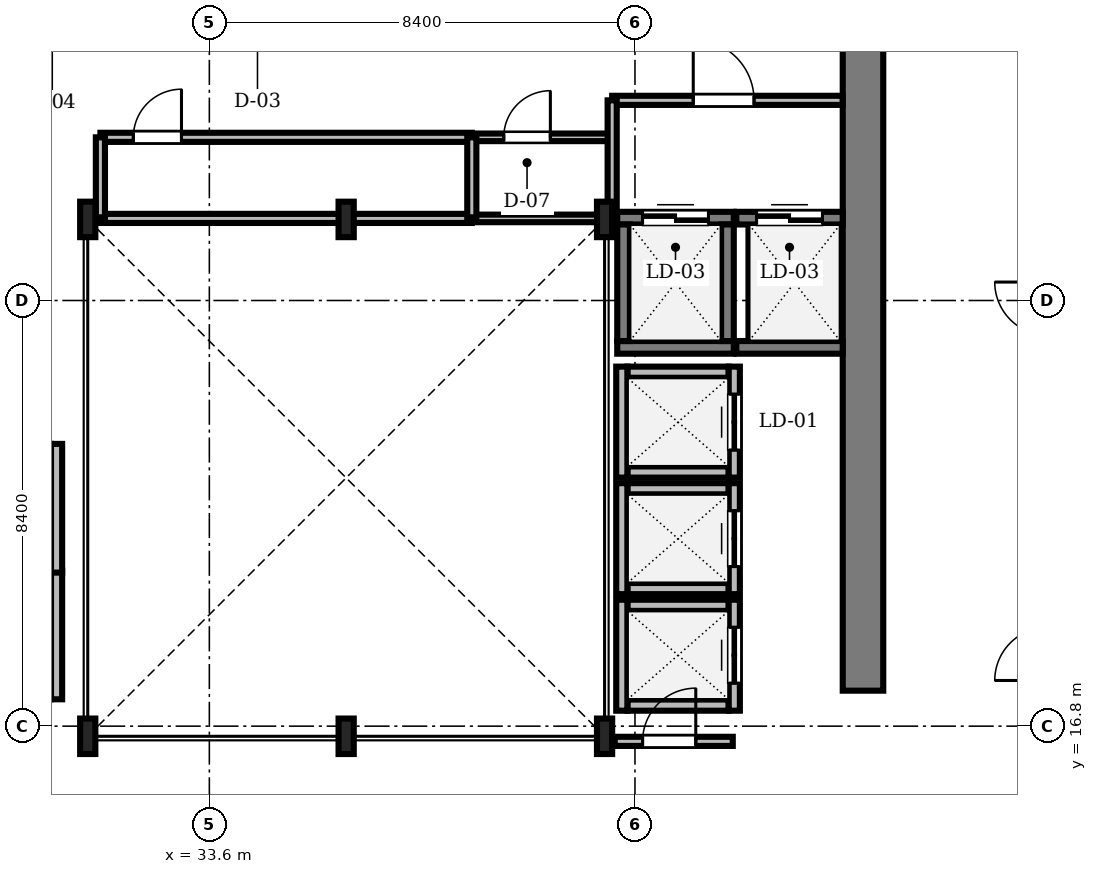
"""IFC4 building model, lengths in metres.
Left out: names, types, materials, properties, quantities, classifications, styles, units other than length and angle.
Written with IfcOpenShell. Run it as: python <this file> out.ifc"""

import sys

from ifc_helpers import new_model, si_unit, direction, frame, frame_2d, origin, origin_2d, place, context, subcontext, project, spatial, rectangle, i_section, extrude, source, transform, mapped, element, fill, save


model = new_model("IFC4")
c1 = context("Model", 3, precision=1e-05, world=origin(), true_north=direction((0.0, 1.0)))
c2 = subcontext(c1, "Body", "Model", "MODEL_VIEW")
j1 = project(units=[si_unit("LENGTHUNIT", "METRE"), si_unit("PLANEANGLEUNIT", "RADIAN")], contexts=[c1])
p1 = place(None, origin())
s1 = spatial("IfcSite", under=j1, at=p1, CompositionType="ELEMENT")
p2 = place(p1, origin())
s2 = spatial("IfcBuilding", under=s1, at=p2, CompositionType="ELEMENT")
p3 = place(p2, frame((0.0, 0.0, 199.8)))
s3 = spatial("IfcBuildingStorey", under=s2, at=p3, CompositionType="ELEMENT", Elevation=199.8)
m1 = source(origin(), c2, "Body", "SweptSolid", [
    extrude(rectangle(XDim=13.15, YDim=0.8, at=frame_2d((6.575, 0.0))), origin(), (0.0, 0.0, 1.0), 3.53),
])
p4 = place(p3, frame((46.5, 17.5, 0.0), z_axis=(0.0, 0.0, 1.0), x_axis=(0.0, 1.0, 0.0)))
e1 = element("IfcWall", 1, at=p4, inside=s3, PredefinedType="SHEAR", context=c2, shape_type="MappedRepresentation", body=[
    mapped(m1, transform((0.0, 0.0, 0.0), scale=1.0)),
])
m2 = source(origin(), c2, "Body", "SweptSolid", [
    extrude(i_section(OverallWidth=0.3, OverallDepth=0.7, WebThickness=0.017, FlangeThickness=0.032, FilletRadius=0.027, at=origin_2d()), origin(), (0.0, 0.0, 1.0), 3.53),
])
for number, where, z_axis, x_axis in (
    (2, (31.2, 16.6, 0.0), (0.0, 0.0, 1.0), (1.0, 0.0, 0.0)),
    (3, (36.3, 16.6, 0.0), (0.0, 0.0, 1.0), (1.0, 0.0, 0.0)),
    (4, (41.4, 16.6, 0.0), (0.0, 0.0, 1.0), (1.0, 0.0, 0.0)),
    (5, (41.4, 26.8, 0.0), (0.0, 0.0, 1.0), (1.0, 0.0, 0.0)),
    (6, (36.3, 26.8, 0.0), (0.0, 0.0, 1.0), (1.0, 0.0, 0.0)),
    (7, (31.2, 26.8, 0.0), (0.0, 0.0, 1.0), (1.0, 0.0, 0.0)),
):
    element("IfcColumn", number, at=place(p3, frame(where, z_axis=z_axis, x_axis=x_axis)), inside=s3, PredefinedType="COLUMN", context=c2, shape_type="MappedRepresentation", body=[
        mapped(m2, transform((0.0, 0.0, 0.0), scale=1.0)),
    ])
m3 = source(origin(), c2, "Body", "SweptSolid", [
    extrude(rectangle(XDim=2.0, YDim=0.22, at=frame_2d((1.0, 0.0))), origin(), (0.0, 0.0, 1.0), 3.53),
])
for number, where, z_axis, x_axis in (
    (8, (41.85, 21.815, 0.0), (0.0, 0.0, 1.0), (1.0, 0.0, 0.0)),
    (9, (41.85, 23.785, 0.0), (0.0, 0.0, 1.0), (1.0, 0.0, 0.0)),
):
    element("IfcWall", number, at=place(p3, frame(where, z_axis=z_axis, x_axis=x_axis)), inside=s3, PredefinedType="SOLIDWALL", context=c2, shape_type="MappedRepresentation", body=[
        mapped(m3, transform((0.0, 0.0, 0.0), scale=1.0)),
    ])
m4 = source(origin(), c2, "Body", "SweptSolid", [
    extrude(rectangle(XDim=2.19, YDim=0.22, at=frame_2d((1.095, 0.0))), origin(), (0.0, 0.0, 1.0), 3.53),
])
p5 = place(p3, frame((41.74, 21.705, 0.0), z_axis=(0.0, 0.0, 1.0), x_axis=(0.0, 1.0, 0.0)))
e10 = element("IfcWall", 10, at=p5, inside=s3, PredefinedType="SOLIDWALL", context=c2, shape_type="MappedRepresentation", body=[
    mapped(m4, transform((0.0, 0.0, 0.0), scale=1.0)),
])
p6 = place(p3, frame((43.96, 21.705, 0.0), z_axis=(0.0, 0.0, 1.0), x_axis=(0.0, 1.0, 0.0)))
e11 = element("IfcWall", 11, at=p6, inside=s3, PredefinedType="SOLIDWALL", context=c2, shape_type="MappedRepresentation", body=[
    mapped(m4, transform((0.0, 0.0, 0.0), scale=1.0)),
])
m5 = source(origin(), c2, "Body", "SweptSolid", [
    extrude(rectangle(XDim=1.1, YDim=2.2, at=frame_2d((0.55, 1.1))), frame((0.0, 0.12, 0.0), z_axis=(0.0, -1.0, 0.0), x_axis=(1.0, 0.0, 0.0)), (0.0, 0.0, 1.0), 0.24),
])
p7 = place(p6, frame((0.545, 0.0, 0.0)))
e12 = element("IfcOpeningElement", 12, at=p7, cuts=e11, PredefinedType="OPENING", context=c2, shape_type="MappedRepresentation", body=[
    mapped(m5, transform((0.0, 0.0, 0.0), scale=1.0)),
])
for number, where, z_axis, x_axis in (
    (13, (41.85, 19.515, 0.0), (0.0, 0.0, 1.0), (1.0, 0.0, 0.0)),
    (14, (41.85, 21.485, 0.0), (0.0, 0.0, 1.0), (1.0, 0.0, 0.0)),
):
    element("IfcWall", number, at=place(p3, frame(where, z_axis=z_axis, x_axis=x_axis)), inside=s3, PredefinedType="SOLIDWALL", context=c2, shape_type="MappedRepresentation", body=[
        mapped(m3, transform((0.0, 0.0, 0.0), scale=1.0)),
    ])
p8 = place(p3, frame((41.74, 19.405, 0.0), z_axis=(0.0, 0.0, 1.0), x_axis=(0.0, 1.0, 0.0)))
e15 = element("IfcWall", 15, at=p8, inside=s3, PredefinedType="SOLIDWALL", context=c2, shape_type="MappedRepresentation", body=[
    mapped(m4, transform((0.0, 0.0, 0.0), scale=1.0)),
])
p9 = place(p3, frame((43.96, 19.405, 0.0), z_axis=(0.0, 0.0, 1.0), x_axis=(0.0, 1.0, 0.0)))
e16 = element("IfcWall", 16, at=p9, inside=s3, PredefinedType="SOLIDWALL", context=c2, shape_type="MappedRepresentation", body=[
    mapped(m4, transform((0.0, 0.0, 0.0), scale=1.0)),
])
p10 = place(p9, frame((0.545, 0.0, 0.0)))
e17 = element("IfcOpeningElement", 17, at=p10, cuts=e16, PredefinedType="OPENING", context=c2, shape_type="MappedRepresentation", body=[
    mapped(m5, transform((0.0, 0.0, 0.0), scale=1.0)),
])
for number, where, z_axis, x_axis in (
    (18, (41.85, 17.215, 0.0), (0.0, 0.0, 1.0), (1.0, 0.0, 0.0)),
    (19, (41.85, 19.185, 0.0), (0.0, 0.0, 1.0), (1.0, 0.0, 0.0)),
):
    element("IfcWall", number, at=place(p3, frame(where, z_axis=z_axis, x_axis=x_axis)), inside=s3, PredefinedType="SOLIDWALL", context=c2, shape_type="MappedRepresentation", body=[
        mapped(m3, transform((0.0, 0.0, 0.0), scale=1.0)),
    ])
p11 = place(p3, frame((41.74, 17.105, 0.0), z_axis=(0.0, 0.0, 1.0), x_axis=(0.0, 1.0, 0.0)))
e20 = element("IfcWall", 20, at=p11, inside=s3, PredefinedType="SOLIDWALL", context=c2, shape_type="MappedRepresentation", body=[
    mapped(m4, transform((0.0, 0.0, 0.0), scale=1.0)),
])
p12 = place(p3, frame((43.96, 17.105, 0.0), z_axis=(0.0, 0.0, 1.0), x_axis=(0.0, 1.0, 0.0)))
e21 = element("IfcWall", 21, at=p12, inside=s3, PredefinedType="SOLIDWALL", context=c2, shape_type="MappedRepresentation", body=[
    mapped(m4, transform((0.0, 0.0, 0.0), scale=1.0)),
])
p13 = place(p12, frame((0.545, 0.0, 0.0)))
e22 = element("IfcOpeningElement", 22, at=p13, cuts=e21, PredefinedType="OPENING", context=c2, shape_type="MappedRepresentation", body=[
    mapped(m5, transform((0.0, 0.0, 0.0), scale=1.0)),
])
m6 = source(origin(), c2, "Body", "SweptSolid", [
    extrude(rectangle(XDim=2.54, YDim=0.22, at=frame_2d((1.27, 0.0))), origin(), (0.0, 0.0, 1.0), 3.53),
])
for number, where, z_axis, x_axis in (
    (23, (30.585, 17.33, 0.0), (0.0, 0.0, 1.0), (0.0, 1.0, 0.0)),
    (24, (30.585, 19.83, 0.0), (0.0, 0.0, 1.0), (0.0, 1.0, 0.0)),
):
    element("IfcWall", number, at=place(p3, frame(where, z_axis=z_axis, x_axis=x_axis)), inside=s3, PredefinedType="SOLIDWALL", context=c2, shape_type="MappedRepresentation", body=[
        mapped(m6, transform((0.0, 0.0, 0.0), scale=1.0)),
    ])
m7 = source(origin(), c2, "Body", "SweptSolid", [
    extrude(rectangle(XDim=2.3, YDim=0.25, at=frame_2d((1.15, 0.0))), origin(), (0.0, 0.0, 1.0), 3.53),
])
p14 = place(p3, frame((41.65, 24.275, 0.0), z_axis=(0.0, 0.0, 1.0), x_axis=(1.0, 0.0, 0.0)))
e25 = element("IfcWall", 25, at=p14, inside=s3, PredefinedType="SOLIDWALL", context=c2, shape_type="MappedRepresentation", body=[
    mapped(m7, transform((0.0, 0.0, 0.0), scale=1.0)),
])
p15 = place(p3, frame((41.65, 26.825, 0.0), z_axis=(0.0, 0.0, 1.0), x_axis=(1.0, 0.0, 0.0)))
e26 = element("IfcWall", 26, at=p15, inside=s3, PredefinedType="SOLIDWALL", context=c2, shape_type="MappedRepresentation", body=[
    mapped(m7, transform((0.0, 0.0, 0.0), scale=1.0)),
])
m8 = source(origin(), c2, "Body", "SweptSolid", [
    extrude(rectangle(XDim=1.3, YDim=2.3, at=frame_2d((0.65, 1.15))), frame((0.0, 0.135, 0.0), z_axis=(0.0, -1.0, 0.0), x_axis=(1.0, 0.0, 0.0)), (0.0, 0.0, 1.0), 0.27),
])
p16 = place(p15, frame((0.5, 0.0, 0.0)))
e27 = element("IfcOpeningElement", 27, at=p16, cuts=e26, PredefinedType="OPENING", context=c2, shape_type="MappedRepresentation", body=[
    mapped(m8, transform((0.0, 0.0, 0.0), scale=1.0)),
])
for number, where, z_axis, x_axis in (
    (28, (41.775, 24.4, 0.0), (0.0, 0.0, 1.0), (0.0, 1.0, 0.0)),
    (29, (43.825, 24.4, 0.0), (0.0, 0.0, 1.0), (0.0, 1.0, 0.0)),
):
    element("IfcWall", number, at=place(p3, frame(where, z_axis=z_axis, x_axis=x_axis)), inside=s3, PredefinedType="SOLIDWALL", context=c2, shape_type="MappedRepresentation", body=[
        mapped(m7, transform((0.0, 0.0, 0.0), scale=1.0)),
    ])
m9 = source(origin(), c2, "Body", "SweptSolid", [
    extrude(rectangle(XDim=2.1, YDim=0.25, at=frame_2d((1.05, 0.0))), origin(), (0.0, 0.0, 1.0), 3.53),
])
p17 = place(p3, frame((44.0, 24.275, 0.0), z_axis=(0.0, 0.0, 1.0), x_axis=(1.0, 0.0, 0.0)))
e30 = element("IfcWall", 30, at=p17, inside=s3, PredefinedType="SOLIDWALL", context=c2, shape_type="MappedRepresentation", body=[
    mapped(m9, transform((0.0, 0.0, 0.0), scale=1.0)),
])
p18 = place(p3, frame((44.0, 26.825, 0.0), z_axis=(0.0, 0.0, 1.0), x_axis=(1.0, 0.0, 0.0)))
e31 = element("IfcWall", 31, at=p18, inside=s3, PredefinedType="SOLIDWALL", context=c2, shape_type="MappedRepresentation", body=[
    mapped(m9, transform((0.0, 0.0, 0.0), scale=1.0)),
])
p19 = place(p18, frame((0.4, 0.0, 0.0)))
e32 = element("IfcOpeningElement", 32, at=p19, cuts=e31, PredefinedType="OPENING", context=c2, shape_type="MappedRepresentation", body=[
    mapped(m8, transform((0.0, 0.0, 0.0), scale=1.0)),
])
m10 = source(origin(), c2, "Body", "SweptSolid", [
    extrude(rectangle(XDim=7.33, YDim=0.18, at=frame_2d((3.665, 0.0))), origin(), (0.0, 0.0, 1.0), 3.162),
])
p20 = place(p3, frame((31.45, 28.42, 0.0), z_axis=(0.0, 0.0, 1.0), x_axis=(1.0, 0.0, 0.0)))
e33 = element("IfcWall", 33, at=p20, inside=s3, PredefinedType="PARTITIONING", context=c2, shape_type="MappedRepresentation", body=[
    mapped(m10, transform((0.0, 0.0, 0.0), scale=1.0)),
])
m11 = source(origin(), c2, "Body", "SweptSolid", [
    extrude(rectangle(XDim=0.95, YDim=2.15, at=frame_2d((0.475, 1.075))), frame((0.0, 0.1, 0.0), z_axis=(0.0, -1.0, 0.0), x_axis=(1.0, 0.0, 0.0)), (0.0, 0.0, 1.0), 0.2),
])
p21 = place(p20, frame((0.65, 0.0, 0.0)))
e34 = element("IfcOpeningElement", 34, at=p21, cuts=e33, PredefinedType="OPENING", context=c2, shape_type="MappedRepresentation", body=[
    mapped(m11, transform((0.0, 0.0, 0.0), scale=1.0)),
])
m12 = source(origin(), c2, "Body", "SweptSolid", [
    extrude(rectangle(XDim=4.548, YDim=0.18, at=frame_2d((2.274, 0.0))), origin(), (0.0, 0.0, 1.0), 3.162),
])
p22 = place(p3, frame((41.55, 29.15, 0.0), z_axis=(0.0, 0.0, 1.0), x_axis=(1.0, 0.0, 0.0)))
e35 = element("IfcWall", 35, at=p22, inside=s3, PredefinedType="PARTITIONING", context=c2, shape_type="MappedRepresentation", body=[
    mapped(m12, transform((0.0, 0.0, 0.0), scale=1.0)),
])
m13 = source(origin(), c2, "Body", "SweptSolid", [
    extrude(rectangle(XDim=1.2, YDim=2.2, at=frame_2d((0.6, 1.1))), frame((0.0, 0.1, 0.0), z_axis=(0.0, -1.0, 0.0), x_axis=(1.0, 0.0, 0.0)), (0.0, 0.0, 1.0), 0.2),
])
p23 = place(p22, frame((1.6, 0.0, 0.0)))
e36 = element("IfcOpeningElement", 36, at=p23, cuts=e35, PredefinedType="OPENING", context=c2, shape_type="MappedRepresentation", body=[
    mapped(m13, transform((0.0, 0.0, 0.0), scale=1.0)),
])
m14 = source(origin(), c2, "Body", "SweptSolid", [
    extrude(rectangle(XDim=2.74, YDim=0.15, at=frame_2d((1.37, 0.0))), origin(), (0.0, 0.0, 1.0), 3.53),
])
p24 = place(p3, frame((38.78, 28.42, 0.0), z_axis=(0.0, 0.0, 1.0), x_axis=(1.0, 0.0, 0.0)))
e37 = element("IfcWall", 37, at=p24, inside=s3, PredefinedType="PARTITIONING", context=c2, shape_type="MappedRepresentation", body=[
    mapped(m14, transform((0.0, 0.0, 0.0), scale=1.0)),
])
m15 = source(origin(), c2, "Body", "SweptSolid", [
    extrude(rectangle(XDim=0.92, YDim=2.1, at=frame_2d((0.46, 1.05))), frame((0.0, 0.085, 0.0), z_axis=(0.0, -1.0, 0.0), x_axis=(1.0, 0.0, 0.0)), (0.0, 0.0, 1.0), 0.17),
])
p25 = place(p24, frame((0.63, 0.0, 0.0)))
e38 = element("IfcOpeningElement", 38, at=p25, cuts=e37, PredefinedType="OPENING", context=c2, shape_type="MappedRepresentation", body=[
    mapped(m15, transform((0.0, 0.0, 0.0), scale=1.0)),
])
m16 = source(origin(), c2, "Body", "SweptSolid", [
    extrude(rectangle(XDim=2.33, YDim=0.18, at=frame_2d((1.165, 0.0))), origin(), (0.0, 0.0, 1.0), 2.972),
])
p26 = place(p3, frame((41.6, 16.5, 0.0), z_axis=(0.0, 0.0, 1.0), x_axis=(1.0, 0.0, 0.0)))
e39 = element("IfcWall", 39, at=p26, inside=s3, PredefinedType="PARTITIONING", context=c2, shape_type="MappedRepresentation", body=[
    mapped(m16, transform((0.0, 0.0, 0.0), scale=1.0)),
])
m17 = source(origin(), c2, "Body", "SweptSolid", [
    extrude(rectangle(XDim=1.05, YDim=2.2, at=frame_2d((0.525, 1.1))), frame((0.0, 0.1, 0.0), z_axis=(0.0, -1.0, 0.0), x_axis=(1.0, 0.0, 0.0)), (0.0, 0.0, 1.0), 0.2),
])
p27 = place(p26, frame((0.55, 0.0, 0.0)))
e40 = element("IfcOpeningElement", 40, at=p27, cuts=e39, PredefinedType="OPENING", context=c2, shape_type="MappedRepresentation", body=[
    mapped(m17, transform((0.0, 0.0, 0.0), scale=1.0)),
])
m18 = source(origin(), c2, "Body", "SweptSolid", [
    extrude(rectangle(XDim=7.33, YDim=0.18, at=frame_2d((3.665, 0.0))), origin(), (0.0, 0.0, 1.0), 3.072),
])
p28 = place(p3, frame((31.45, 26.82, 0.0), z_axis=(0.0, 0.0, 1.0), x_axis=(1.0, 0.0, 0.0)))
e41 = element("IfcWall", 41, at=p28, inside=s3, PredefinedType="PARTITIONING", context=c2, shape_type="MappedRepresentation", body=[
    mapped(m18, transform((0.0, 0.0, 0.0), scale=1.0)),
])
m19 = source(origin(), c2, "Body", "SweptSolid", [
    extrude(rectangle(XDim=2.74, YDim=0.15, at=frame_2d((1.37, 0.0))), origin(), (0.0, 0.0, 1.0), 2.972),
])
p29 = place(p3, frame((38.78, 26.82, 0.0), z_axis=(0.0, 0.0, 1.0), x_axis=(1.0, 0.0, 0.0)))
e42 = element("IfcWall", 42, at=p29, inside=s3, PredefinedType="PARTITIONING", context=c2, shape_type="MappedRepresentation", body=[
    mapped(m19, transform((0.0, 0.0, 0.0), scale=1.0)),
])
m20 = source(origin(), c2, "Body", "SweptSolid", [
    extrude(rectangle(XDim=2.35, YDim=0.18, at=frame_2d((1.175, 0.0))), origin(), (0.0, 0.0, 1.0), 2.972),
])
p30 = place(p3, frame((41.55, 26.8, 0.0), z_axis=(0.0, 0.0, 1.0), x_axis=(0.0, 1.0, 0.0)))
e43 = element("IfcWall", 43, at=p30, inside=s3, PredefinedType="PARTITIONING", context=c2, shape_type="MappedRepresentation", body=[
    mapped(m20, transform((0.0, 0.0, 0.0), scale=1.0)),
])
m21 = source(origin(), c2, "Body", "SweptSolid", [
    extrude(rectangle(XDim=1.6, YDim=0.18, at=frame_2d((0.8, 0.0))), origin(), (0.0, 0.0, 1.0), 3.072),
])
for number, where, z_axis, x_axis in (
    (44, (31.45, 26.82, 0.0), (0.0, 0.0, 1.0), (0.0, 1.0, 0.0)),
    (45, (38.78, 26.82, 0.0), (0.0, 0.0, 1.0), (0.0, 1.0, 0.0)),
):
    element("IfcWall", number, at=place(p3, frame(where, z_axis=z_axis, x_axis=x_axis)), inside=s3, PredefinedType="PARTITIONING", context=c2, shape_type="MappedRepresentation", body=[
        mapped(m21, transform((0.0, 0.0, 0.0), scale=1.0)),
    ])
m22 = source(origin(), c2, "Body", "SweptSolid", [
    extrude(rectangle(XDim=1.1, YDim=2.2, at=frame_2d((0.55, 1.1))), frame((0.0, 0.025, 0.0), z_axis=(0.0, -1.0, 0.0), x_axis=(1.0, 0.0, 0.0)), (0.0, 0.0, 1.0), 0.05),
])
p31 = place(p7, origin())
e46 = element("IfcDoor", 46, at=p31, inside=s3, OperationType="DOUBLE_DOOR_SLIDING", PredefinedType="DOOR", context=c2, shape_type="MappedRepresentation", body=[
    mapped(m22, transform((0.0, 0.0, 0.0), scale=1.0)),
])
fill(e12, e46)
p32 = place(p10, origin())
e47 = element("IfcDoor", 47, at=p32, inside=s3, OperationType="DOUBLE_DOOR_SLIDING", PredefinedType="DOOR", context=c2, shape_type="MappedRepresentation", body=[
    mapped(m22, transform((0.0, 0.0, 0.0), scale=1.0)),
])
fill(e17, e47)
p33 = place(p13, origin())
e48 = element("IfcDoor", 48, at=p33, inside=s3, OperationType="DOUBLE_DOOR_SLIDING", PredefinedType="DOOR", context=c2, shape_type="MappedRepresentation", body=[
    mapped(m22, transform((0.0, 0.0, 0.0), scale=1.0)),
])
fill(e22, e48)
m23 = source(origin(), c2, "Body", "SweptSolid", [
    extrude(rectangle(XDim=1.3, YDim=2.3, at=frame_2d((0.65, 1.15))), frame((0.0, 0.025, 0.0), z_axis=(0.0, -1.0, 0.0), x_axis=(1.0, 0.0, 0.0)), (0.0, 0.0, 1.0), 0.05),
])
p34 = place(p16, origin())
e49 = element("IfcDoor", 49, at=p34, inside=s3, OperationType="DOUBLE_DOOR_SLIDING", PredefinedType="DOOR", context=c2, shape_type="MappedRepresentation", body=[
    mapped(m23, transform((0.0, 0.0, 0.0), scale=1.0)),
])
fill(e27, e49)
p35 = place(p19, origin())
e50 = element("IfcDoor", 50, at=p35, inside=s3, OperationType="DOUBLE_DOOR_SLIDING", PredefinedType="DOOR", context=c2, shape_type="MappedRepresentation", body=[
    mapped(m23, transform((0.0, 0.0, 0.0), scale=1.0)),
])
fill(e32, e50)
m24 = source(origin(), c2, "Body", "SweptSolid", [
    extrude(rectangle(XDim=0.95, YDim=2.15, at=frame_2d((0.475, 1.075))), frame((0.0, 0.025, 0.0), z_axis=(0.0, -1.0, 0.0), x_axis=(1.0, 0.0, 0.0)), (0.0, 0.0, 1.0), 0.05),
])
p36 = place(p21, origin())
e51 = element("IfcDoor", 51, at=p36, inside=s3, OperationType="SINGLE_SWING_RIGHT", PredefinedType="DOOR", context=c2, shape_type="MappedRepresentation", body=[
    mapped(m24, transform((0.0, 0.0, 0.0), scale=1.0)),
])
fill(e34, e51)
m25 = source(origin(), c2, "Body", "SweptSolid", [
    extrude(rectangle(XDim=1.2, YDim=2.2, at=frame_2d((0.6, 1.1))), frame((0.0, 0.025, 0.0), z_axis=(0.0, -1.0, 0.0), x_axis=(1.0, 0.0, 0.0)), (0.0, 0.0, 1.0), 0.05),
])
p37 = place(p23, origin())
e52 = element("IfcDoor", 52, at=p37, inside=s3, OperationType="SINGLE_SWING_LEFT", PredefinedType="DOOR", context=c2, shape_type="MappedRepresentation", body=[
    mapped(m25, transform((0.0, 0.0, 0.0), scale=1.0)),
])
fill(e36, e52)
m26 = source(origin(), c2, "Body", "SweptSolid", [
    extrude(rectangle(XDim=0.92, YDim=2.1, at=frame_2d((0.46, 1.05))), frame((0.0, 0.025, 0.0), z_axis=(0.0, -1.0, 0.0), x_axis=(1.0, 0.0, 0.0)), (0.0, 0.0, 1.0), 0.05),
])
p38 = place(p25, origin())
e53 = element("IfcDoor", 53, at=p38, inside=s3, OperationType="SINGLE_SWING_RIGHT", PredefinedType="DOOR", context=c2, shape_type="MappedRepresentation", body=[
    mapped(m26, transform((0.0, 0.0, 0.0), scale=1.0)),
])
fill(e38, e53)
m27 = source(origin(), c2, "Body", "SweptSolid", [
    extrude(rectangle(XDim=1.05, YDim=2.2, at=frame_2d((0.525, 1.1))), frame((0.0, 0.025, 0.0), z_axis=(0.0, -1.0, 0.0), x_axis=(1.0, 0.0, 0.0)), (0.0, 0.0, 1.0), 0.05),
])
p39 = place(p27, origin())
e54 = element("IfcDoor", 54, at=p39, inside=s3, OperationType="SINGLE_SWING_RIGHT", PredefinedType="DOOR", context=c2, shape_type="MappedRepresentation", body=[
    mapped(m27, transform((0.0, 0.0, 0.0), scale=1.0)),
])
fill(e40, e54)
save(model, sys.argv[1])
